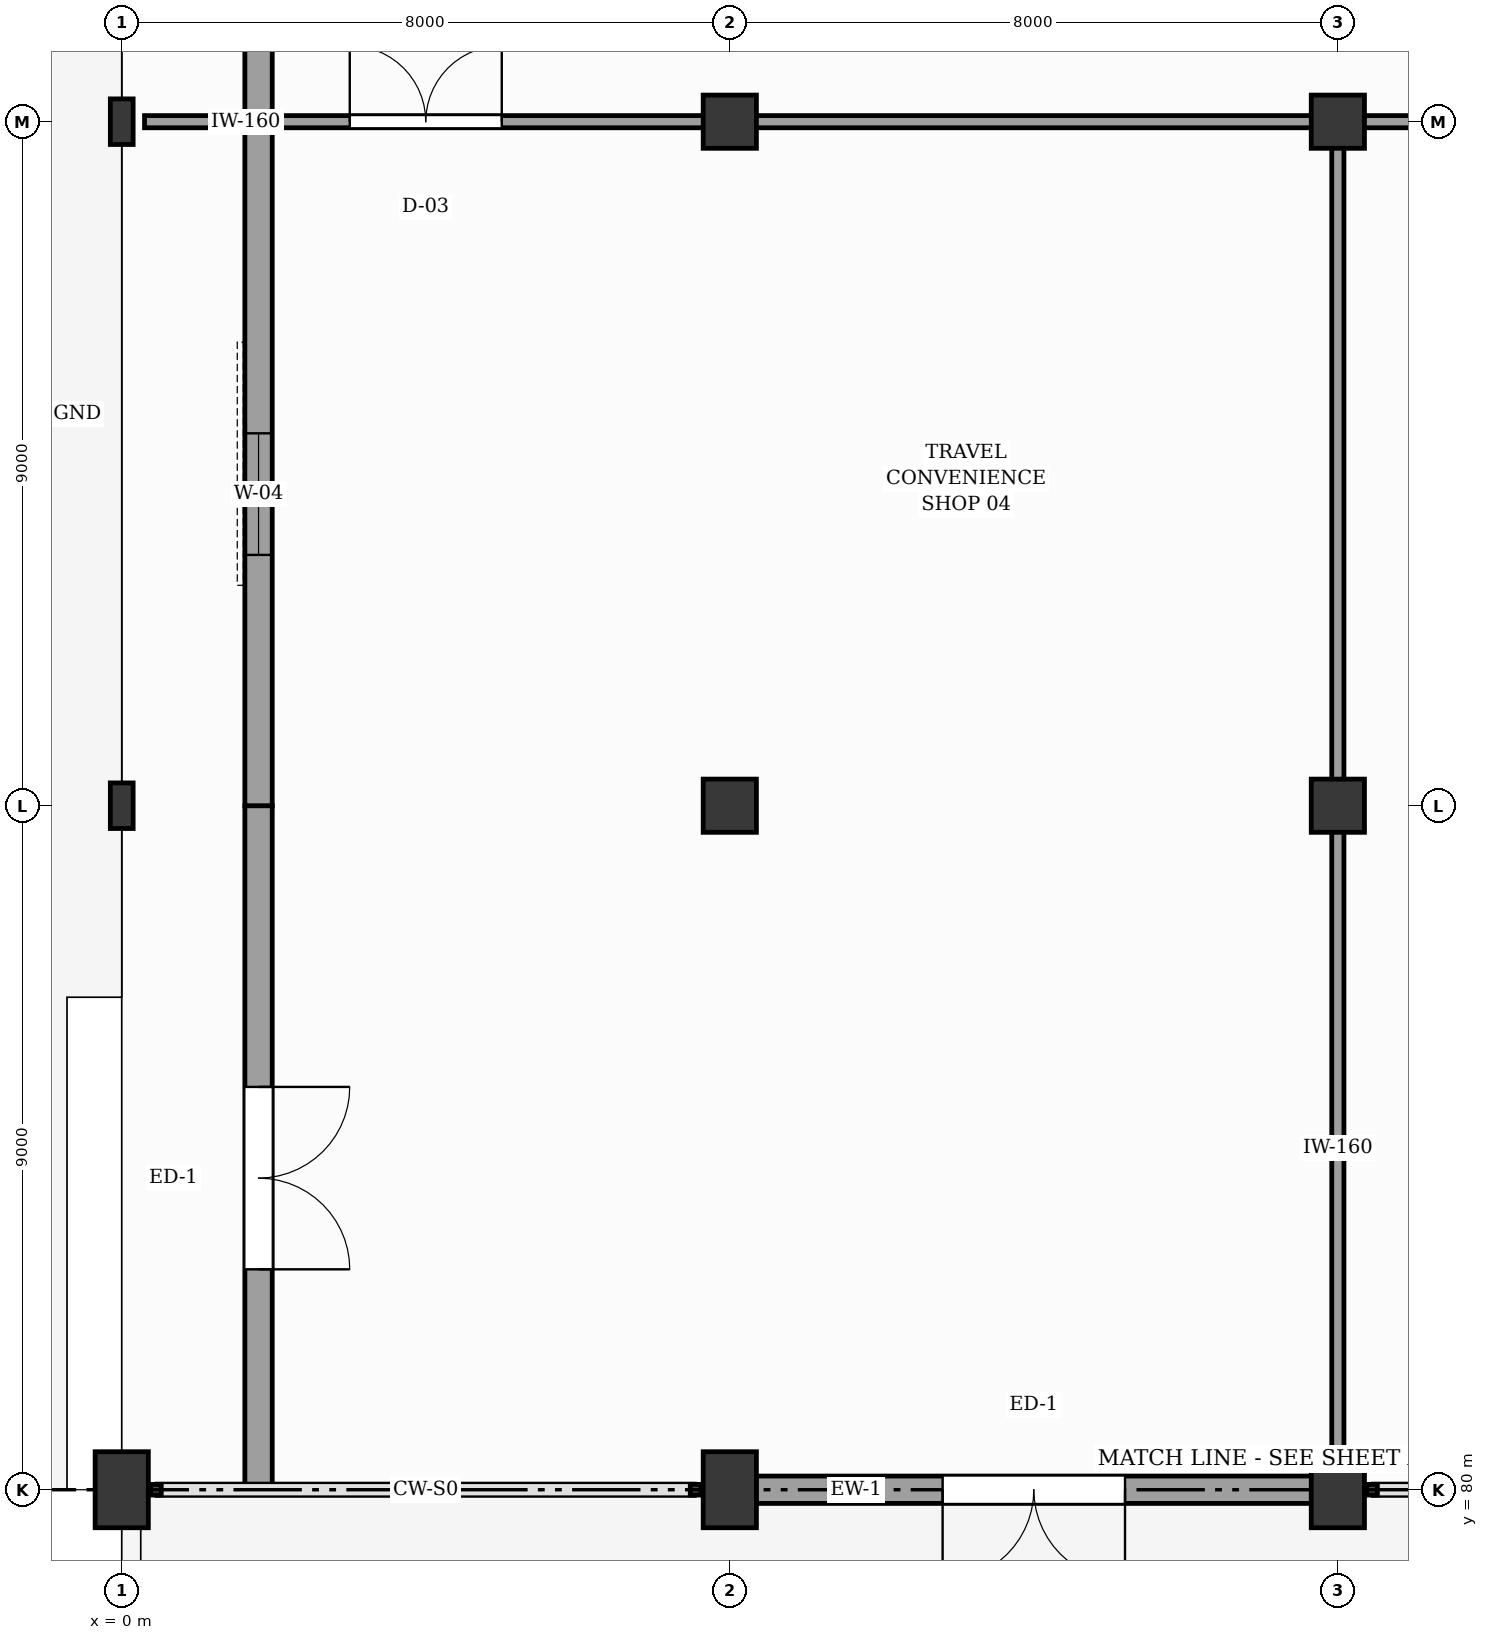
"""IFC4 building model, lengths in metres.
Left out: names, types, materials, properties, quantities, classifications, styles, units other than length and angle.
Written with IfcOpenShell. Run it as: python <this file> out.ifc"""

import sys

from ifc_helpers import new_model, si_unit, direction, frame, frame_2d, origin, origin_2d, place, context, subcontext, project, spatial, rectangle, i_section, extrude, element, fill, save


model = new_model("IFC4")
c1 = context("Model", 3, precision=1e-05, world=origin(), true_north=direction((0.0, 1.0)))
c2 = subcontext(c1, "Body", "Model", "MODEL_VIEW")
j1 = project(units=[si_unit("LENGTHUNIT", "METRE"), si_unit("PLANEANGLEUNIT", "RADIAN")], contexts=[c1])
p1 = place(None, origin())
s1 = spatial("IfcSite", under=j1, at=p1, CompositionType="ELEMENT")
p2 = place(p1, origin())
s2 = spatial("IfcBuilding", under=s1, at=p2, CompositionType="ELEMENT")
p3 = place(p2, origin())
s3 = spatial("IfcBuildingStorey", under=s2, at=p3, CompositionType="ELEMENT", Elevation=0.0)
p4 = place(p3, frame((0.0, 80.0, -0.3), z_axis=(0.0, 0.0, 1.0), x_axis=(1.0, 0.0, 0.0)))
e1 = element("IfcColumn", 1, at=p4, inside=s3, PredefinedType="COLUMN", context=c2, shape_type="SweptSolid", body=[
    extrude(rectangle(XDim=0.7, YDim=1.0, at=origin_2d()), origin(), (0.0, 0.0, 1.0), 5.1),
])
for number, where, z_axis, x_axis in (
    (2, (0.0, 89.0, -0.3), (0.0, 0.0, 1.0), (1.0, 0.0, 0.0)),
    (3, (0.0, 98.0, -0.3), (0.0, 0.0, 1.0), (1.0, 0.0, 0.0)),
):
    element("IfcColumn", number, at=place(p3, frame(where, z_axis=z_axis, x_axis=x_axis)), inside=s3, PredefinedType="COLUMN", context=c2, shape_type="SweptSolid", body=[
        extrude(i_section(OverallWidth=0.3, OverallDepth=0.6, WebThickness=0.015, FlangeThickness=0.03, FilletRadius=0.027, at=origin_2d()), origin(), (0.0, 0.0, 1.0), 5.1),
    ])
p5 = place(p3, frame((8.0, 80.0, -0.3), z_axis=(0.0, 0.0, 1.0), x_axis=(1.0, 0.0, 0.0)))
e4 = element("IfcColumn", 4, at=p5, inside=s3, PredefinedType="COLUMN", context=c2, shape_type="SweptSolid", body=[
    extrude(rectangle(XDim=0.7, YDim=1.0, at=origin_2d()), origin(), (0.0, 0.0, 1.0), 5.1),
])
for number, where, z_axis, x_axis in (
    (5, (8.0, 89.0, -0.3), (0.0, 0.0, 1.0), (1.0, 0.0, 0.0)),
    (6, (8.0, 98.0, -0.3), (0.0, 0.0, 1.0), (1.0, 0.0, 0.0)),
):
    element("IfcColumn", number, at=place(p3, frame(where, z_axis=z_axis, x_axis=x_axis)), inside=s3, PredefinedType="COLUMN", context=c2, shape_type="SweptSolid", body=[
        extrude(rectangle(XDim=0.7, YDim=0.7, at=origin_2d()), origin(), (0.0, 0.0, 1.0), 5.1),
    ])
p6 = place(p3, frame((16.0, 80.0, -0.3), z_axis=(0.0, 0.0, 1.0), x_axis=(1.0, 0.0, 0.0)))
e7 = element("IfcColumn", 7, at=p6, inside=s3, PredefinedType="COLUMN", context=c2, shape_type="SweptSolid", body=[
    extrude(rectangle(XDim=0.7, YDim=1.0, at=origin_2d()), origin(), (0.0, 0.0, 1.0), 5.1),
])
for number, where, z_axis, x_axis in (
    (8, (16.0, 89.0, -0.3), (0.0, 0.0, 1.0), (1.0, 0.0, 0.0)),
    (9, (16.0, 98.0, -0.3), (0.0, 0.0, 1.0), (1.0, 0.0, 0.0)),
):
    element("IfcColumn", number, at=place(p3, frame(where, z_axis=z_axis, x_axis=x_axis)), inside=s3, PredefinedType="COLUMN", context=c2, shape_type="SweptSolid", body=[
        extrude(rectangle(XDim=0.7, YDim=0.7, at=origin_2d()), origin(), (0.0, 0.0, 1.0), 5.1),
    ])
p7 = place(p3, frame((8.345, 80.0, 0.0), z_axis=(0.0, 0.0, 1.0), x_axis=(1.0, 0.0, 0.0)))
e10 = element("IfcWall", 10, at=p7, inside=s3, PredefinedType="SOLIDWALL", context=c2, shape_type="SweptSolid", body=[
    extrude(rectangle(XDim=7.31, YDim=0.36, at=frame_2d((3.655, 0.0))), origin(), (0.0, 0.0, 1.0), 3.31),
])
p8 = place(p7, frame((2.455, 0.0, 0.0)))
e11 = element("IfcOpeningElement", 11, at=p8, cuts=e10, PredefinedType="OPENING", context=c2, shape_type="SweptSolid", body=[
    extrude(rectangle(XDim=2.4, YDim=2.35, at=frame_2d((1.2, 1.175))), frame((0.0, 0.19, 0.0), z_axis=(0.0, -1.0, 0.0), x_axis=(1.0, 0.0, 0.0)), (0.0, 0.0, 1.0), 0.38),
])
p9 = place(p3, frame((1.8, 80.0, 0.0), z_axis=(0.0, 0.0, 1.0), x_axis=(0.0, 1.0, 0.0)))
e12 = element("IfcWall", 12, at=p9, inside=s3, PredefinedType="SOLIDWALL", context=c2, shape_type="SweptSolid", body=[
    extrude(rectangle(XDim=9.0, YDim=0.36, at=frame_2d((4.5, 0.0))), origin(), (0.0, 0.0, 1.0), 3.31),
])
p10 = place(p9, frame((2.9, 0.0, 0.0)))
e13 = element("IfcOpeningElement", 13, at=p10, cuts=e12, PredefinedType="OPENING", context=c2, shape_type="SweptSolid", body=[
    extrude(rectangle(XDim=2.4, YDim=2.35, at=frame_2d((1.2, 1.175))), frame((0.0, 0.19, 0.0), z_axis=(0.0, -1.0, 0.0), x_axis=(1.0, 0.0, 0.0)), (0.0, 0.0, 1.0), 0.38),
])
p11 = place(p3, frame((1.8, 89.0, 0.0), z_axis=(0.0, 0.0, 1.0), x_axis=(0.0, 1.0, 0.0)))
e14 = element("IfcWall", 14, at=p11, inside=s3, PredefinedType="SOLIDWALL", context=c2, shape_type="SweptSolid", body=[
    extrude(rectangle(XDim=9.0, YDim=0.36, at=frame_2d((4.5, 0.0))), origin(), (0.0, 0.0, 1.0), 3.71),
])
p12 = place(p11, frame((3.3, 0.0, 0.95)))
e15 = element("IfcOpeningElement", 15, at=p12, cuts=e14, PredefinedType="OPENING", context=c2, shape_type="SweptSolid", body=[
    extrude(rectangle(XDim=1.6, YDim=2.1, at=frame_2d((0.8, 1.05))), frame((0.0, 0.19, 0.0), z_axis=(0.0, -1.0, 0.0), x_axis=(1.0, 0.0, 0.0)), (0.0, 0.0, 1.0), 0.38),
])
p13 = place(p3, frame((1.8, 98.0, 0.0), z_axis=(0.0, 0.0, 1.0), x_axis=(0.0, 1.0, 0.0)))
e16 = element("IfcWall", 16, at=p13, inside=s3, PredefinedType="SOLIDWALL", context=c2, shape_type="SweptSolid", body=[
    extrude(rectangle(XDim=9.0, YDim=0.36, at=frame_2d((4.5, 0.0))), origin(), (0.0, 0.0, 1.0), 3.71),
])
p14 = place(p13, frame((2.9, 0.0, 0.0)))
e17 = element("IfcOpeningElement", 17, at=p14, cuts=e16, PredefinedType="OPENING", context=c2, shape_type="SweptSolid", body=[
    extrude(rectangle(XDim=2.4, YDim=2.35, at=frame_2d((1.2, 1.175))), frame((0.0, 0.19, 0.0), z_axis=(0.0, -1.0, 0.0), x_axis=(1.0, 0.0, 0.0)), (0.0, 0.0, 1.0), 0.38),
])
p15 = place(p3, frame((0.3, 98.0, 0.0), z_axis=(0.0, 0.0, 1.0), x_axis=(1.0, 0.0, 0.0)))
e18 = element("IfcWall", 18, at=p15, inside=s3, PredefinedType="PARTITIONING", context=c2, shape_type="SweptSolid", body=[
    extrude(rectangle(XDim=7.4, YDim=0.16, at=frame_2d((3.7, 0.0))), origin(), (0.0, 0.0, 1.0), 3.7),
])
p16 = place(p15, frame((2.7, 0.0, 0.0)))
e19 = element("IfcOpeningElement", 19, at=p16, cuts=e18, PredefinedType="OPENING", context=c2, shape_type="SweptSolid", body=[
    extrude(rectangle(XDim=2.0, YDim=2.3, at=frame_2d((1.0, 1.15))), frame((0.0, 0.09, 0.0), z_axis=(0.0, -1.0, 0.0), x_axis=(1.0, 0.0, 0.0)), (0.0, 0.0, 1.0), 0.18),
])
p17 = place(p3, frame((8.3, 98.0, 0.0), z_axis=(0.0, 0.0, 1.0), x_axis=(1.0, 0.0, 0.0)))
e20 = element("IfcWall", 20, at=p17, inside=s3, PredefinedType="PARTITIONING", context=c2, shape_type="SweptSolid", body=[
    extrude(rectangle(XDim=7.4, YDim=0.16, at=frame_2d((3.7, 0.0))), origin(), (0.0, 0.0, 1.0), 3.7),
])
p18 = place(p3, frame((16.0, 80.3, 0.0), z_axis=(0.0, 0.0, 1.0), x_axis=(0.0, 1.0, 0.0)))
e21 = element("IfcWall", 21, at=p18, inside=s3, PredefinedType="PARTITIONING", context=c2, shape_type="SweptSolid", body=[
    extrude(rectangle(XDim=8.4, YDim=0.16, at=frame_2d((4.2, 0.0))), origin(), (0.0, 0.0, 1.0), 3.31),
])
p19 = place(p3, frame((16.0, 89.3, 0.0), z_axis=(0.0, 0.0, 1.0), x_axis=(0.0, 1.0, 0.0)))
e22 = element("IfcWall", 22, at=p19, inside=s3, PredefinedType="PARTITIONING", context=c2, shape_type="SweptSolid", body=[
    extrude(rectangle(XDim=8.4, YDim=0.16, at=frame_2d((4.2, 0.0))), origin(), (0.0, 0.0, 1.0), 3.7),
])
p20 = place(p3, frame((16.3, 98.0, 0.0), z_axis=(0.0, 0.0, 1.0), x_axis=(1.0, 0.0, 0.0)))
e23 = element("IfcWall", 23, at=p20, inside=s3, PredefinedType="PARTITIONING", context=c2, shape_type="SweptSolid", body=[
    extrude(rectangle(XDim=7.4, YDim=0.16, at=frame_2d((3.7, 0.0))), origin(), (0.0, 0.0, 1.0), 3.7),
])
p21 = place(p20, frame((2.8, 0.0, 0.0)))
e24 = element("IfcOpeningElement", 24, at=p21, cuts=e23, PredefinedType="OPENING", context=c2, shape_type="SweptSolid", body=[
    extrude(rectangle(XDim=1.8, YDim=2.25, at=frame_2d((0.9, 1.125))), frame((0.0, 0.09, 0.0), z_axis=(0.0, -1.0, 0.0), x_axis=(1.0, 0.0, 0.0)), (0.0, 0.0, 1.0), 0.18),
])
p22 = place(p8, frame((2.4, 0.0, 0.0), z_axis=(0.0, 0.0, 1.0), x_axis=(-1.0, 0.0, 0.0)))
e25 = element("IfcDoor", 25, at=p22, inside=s3, OperationType="DOUBLE_DOOR_SINGLE_SWING", PredefinedType="DOOR", context=c2, shape_type="SweptSolid", body=[
    extrude(rectangle(XDim=2.4, YDim=2.35, at=frame_2d((1.2, 1.175))), frame((0.0, 0.025, 0.0), z_axis=(0.0, -1.0, 0.0), x_axis=(1.0, 0.0, 0.0)), (0.0, 0.0, 1.0), 0.05),
])
fill(e11, e25)
p23 = place(p10, frame((2.4, 0.0, 0.0), z_axis=(0.0, 0.0, 1.0), x_axis=(-1.0, 0.0, 0.0)))
e26 = element("IfcDoor", 26, at=p23, inside=s3, OperationType="DOUBLE_DOOR_SINGLE_SWING", PredefinedType="DOOR", context=c2, shape_type="SweptSolid", body=[
    extrude(rectangle(XDim=2.4, YDim=2.35, at=frame_2d((1.2, 1.175))), frame((0.0, 0.025, 0.0), z_axis=(0.0, -1.0, 0.0), x_axis=(1.0, 0.0, 0.0)), (0.0, 0.0, 1.0), 0.05),
])
fill(e13, e26)
p24 = place(p12, origin())
e27 = element("IfcWindow", 27, at=p24, inside=s3, PartitioningType="SINGLE_PANEL", PredefinedType="WINDOW", context=c2, shape_type="SweptSolid", body=[
    extrude(rectangle(XDim=1.6, YDim=2.1, at=frame_2d((0.8, 1.05))), frame((0.0, 0.03, 0.0), z_axis=(0.0, -1.0, 0.0), x_axis=(1.0, 0.0, 0.0)), (0.0, 0.0, 1.0), 0.06),
])
fill(e15, e27)
p25 = place(p16, origin())
e28 = element("IfcDoor", 28, at=p25, inside=s3, OperationType="DOUBLE_DOOR_SINGLE_SWING", PredefinedType="DOOR", context=c2, shape_type="SweptSolid", body=[
    extrude(rectangle(XDim=2.0, YDim=2.3, at=frame_2d((1.0, 1.15))), frame((0.0, 0.025, 0.0), z_axis=(0.0, -1.0, 0.0), x_axis=(1.0, 0.0, 0.0)), (0.0, 0.0, 1.0), 0.05),
])
fill(e19, e28)
save(model, sys.argv[1])
